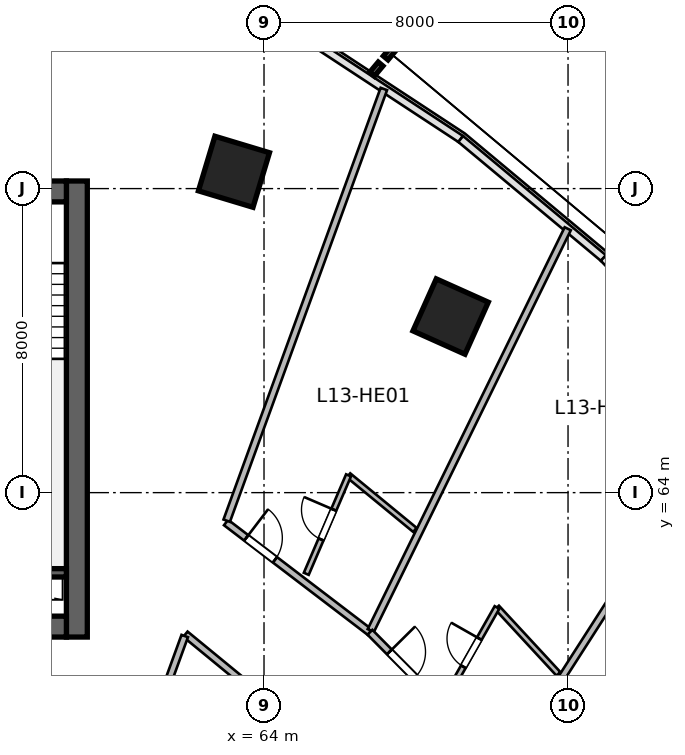
"""IFC4 building model, lengths in metres.
Left out: names, types, materials, properties, quantities, classifications, styles, units other than length and angle.
Written with IfcOpenShell. Run it as: python <this file> out.ifc"""

import sys

from ifc_helpers import new_model, si_unit, direction, frame, frame_2d, origin, origin_2d, place, context, subcontext, project, spatial, rectangle, extrude, source, transform, mapped, element, fill, save


model = new_model("IFC4")
c1 = context("Model", 3, precision=1e-05, world=origin(), true_north=direction((0.0, 1.0)))
c2 = subcontext(c1, "Body", "Model", "MODEL_VIEW")
j1 = project(units=[si_unit("LENGTHUNIT", "METRE"), si_unit("PLANEANGLEUNIT", "RADIAN")], contexts=[c1])
p1 = place(None, origin())
s1 = spatial("IfcSite", under=j1, at=p1, CompositionType="ELEMENT")
p2 = place(p1, origin())
s2 = spatial("IfcBuilding", under=s1, at=p2, CompositionType="ELEMENT")
p3 = place(p2, frame((0.0, 0.0, 60.6)))
s3 = spatial("IfcBuildingStorey", under=s2, at=p3, CompositionType="ELEMENT", Elevation=60.6)
m1 = source(origin(), c2, "Body", "SweptSolid", [
    extrude(rectangle(XDim=12.0, YDim=0.55, at=frame_2d((6.0, 0.0))), origin(), (0.0, 0.0, 1.0), 3.6),
])
p4 = place(p3, frame((59.075, 60.2, 0.0), z_axis=(0.0, 0.0, 1.0), x_axis=(0.0, 1.0, 0.0)))
e1 = element("IfcWall", 1, at=p4, inside=s3, PredefinedType="SHEAR", context=c2, shape_type="MappedRepresentation", body=[
    mapped(m1, transform((0.0, 0.0, 0.0), scale=1.0)),
])
m2 = source(origin(), c2, "Body", "SweptSolid", [
    extrude(rectangle(XDim=21.6, YDim=0.55, at=frame_2d((10.8, 0.0))), origin(), (0.0, 0.0, 1.0), 3.6),
])
p5 = place(p3, frame((37.2, 60.475, 0.0), z_axis=(0.0, 0.0, 1.0), x_axis=(1.0, 0.0, 0.0)))
e2 = element("IfcWall", 2, at=p5, inside=s3, PredefinedType="SHEAR", context=c2, shape_type="MappedRepresentation", body=[
    mapped(m2, transform((0.0, 0.0, 0.0), scale=1.0)),
])
p6 = place(p5, frame((1.1, 0.0, 0.0)))
e3 = element("IfcOpeningElement", 3, at=p6, cuts=e2, PredefinedType="OPENING", context=c2, shape_type="SweptSolid", body=[
    extrude(rectangle(XDim=1.15, YDim=2.15, at=frame_2d((0.575, 1.075))), frame((0.0, 0.285, 0.0), z_axis=(0.0, -1.0, 0.0), x_axis=(1.0, 0.0, 0.0)), (0.0, 0.0, 1.0), 0.57),
])
p7 = place(p5, frame((19.5, 0.0, 0.0)))
e4 = element("IfcOpeningElement", 4, at=p7, cuts=e2, PredefinedType="OPENING", context=c2, shape_type="SweptSolid", body=[
    extrude(rectangle(XDim=0.9, YDim=2.1, at=frame_2d((0.45, 1.05))), frame((0.0, 0.285, 0.0), z_axis=(0.0, -1.0, 0.0), x_axis=(1.0, 0.0, 0.0)), (0.0, 0.0, 1.0), 0.57),
])
p8 = place(p5, frame((12.02, 0.0, 0.0)))
e5 = element("IfcOpeningElement", 5, at=p8, cuts=e2, PredefinedType="OPENING", context=c2, shape_type="SweptSolid", body=[
    extrude(rectangle(XDim=1.6, YDim=2.15, at=frame_2d((0.8, 1.075))), frame((0.0, 0.285, 0.0), z_axis=(0.0, -1.0, 0.0), x_axis=(1.0, 0.0, 0.0)), (0.0, 0.0, 1.0), 0.57),
])
p9 = place(p3, frame((37.2, 71.925, 0.0), z_axis=(0.0, 0.0, 1.0), x_axis=(1.0, 0.0, 0.0)))
e6 = element("IfcWall", 6, at=p9, inside=s3, PredefinedType="SHEAR", context=c2, shape_type="MappedRepresentation", body=[
    mapped(m2, transform((0.0, 0.0, 0.0), scale=1.0)),
])
p10 = place(p9, frame((1.2, 0.0, 0.0)))
e7 = element("IfcOpeningElement", 7, at=p10, cuts=e6, PredefinedType="OPENING", context=c2, shape_type="SweptSolid", body=[
    extrude(rectangle(XDim=0.9, YDim=2.1, at=frame_2d((0.45, 1.05))), frame((0.0, 0.285, 0.0), z_axis=(0.0, -1.0, 0.0), x_axis=(1.0, 0.0, 0.0)), (0.0, 0.0, 1.0), 0.57),
])
p11 = place(p9, frame((14.7, 0.0, 0.0)))
e8 = element("IfcOpeningElement", 8, at=p11, cuts=e6, PredefinedType="OPENING", context=c2, shape_type="SweptSolid", body=[
    extrude(rectangle(XDim=1.2, YDim=2.15, at=frame_2d((0.6, 1.075))), frame((0.0, 0.285, 0.0), z_axis=(0.0, -1.0, 0.0), x_axis=(1.0, 0.0, 0.0)), (0.0, 0.0, 1.0), 0.57),
])
p12 = place(p9, frame((4.15, 0.0, 0.0)))
e9 = element("IfcOpeningElement", 9, at=p12, cuts=e6, PredefinedType="OPENING", context=c2, shape_type="SweptSolid", body=[
    extrude(rectangle(XDim=1.3, YDim=2.15, at=frame_2d((0.65, 1.075))), frame((0.0, 0.285, 0.0), z_axis=(0.0, -1.0, 0.0), x_axis=(1.0, 0.0, 0.0)), (0.0, 0.0, 1.0), 0.57),
])
p13 = place(p9, frame((7.25, 0.0, 0.0)))
e10 = element("IfcOpeningElement", 10, at=p13, cuts=e6, PredefinedType="OPENING", context=c2, shape_type="SweptSolid", body=[
    extrude(rectangle(XDim=0.9, YDim=2.1, at=frame_2d((0.45, 1.05))), frame((0.0, 0.285, 0.0), z_axis=(0.0, -1.0, 0.0), x_axis=(1.0, 0.0, 0.0)), (0.0, 0.0, 1.0), 0.57),
])
m3 = source(origin(), c2, "Body", "SweptSolid", [
    extrude(rectangle(XDim=3.27, YDim=0.22, at=frame_2d((1.635, 0.0))), origin(), (0.0, 0.0, 1.0), 3.6),
])
p14 = place(p3, frame((55.53, 61.89, 0.0), z_axis=(0.0, 0.0, 1.0), x_axis=(1.0, 0.0, 0.0)))
e11 = element("IfcWall", 11, at=p14, inside=s3, PredefinedType="SHEAR", context=c2, shape_type="MappedRepresentation", body=[
    mapped(m3, transform((0.0, 0.0, 0.0), scale=1.0)),
])
m4 = source(origin(), c2, "Body", "SweptSolid", [
    extrude(rectangle(XDim=1.5, YDim=1.5, at=origin_2d()), origin(), (0.0, 0.0, 1.0), 3.6),
])
for number, where, z_axis, x_axis in (
    (12, (63.209, 72.442, 0.0), (0.0, 0.0, 1.0), (0.289, 0.957, 0.0)),
    (13, (68.91, 68.633, 0.0), (0.0, 0.0, 1.0), (0.409, 0.912, 0.0)),
):
    element("IfcColumn", number, at=place(p3, frame(where, z_axis=z_axis, x_axis=x_axis)), inside=s3, PredefinedType="COLUMN", context=c2, shape_type="MappedRepresentation", body=[
        mapped(m4, transform((0.0, 0.0, 0.0), scale=1.0)),
    ])
m5 = source(origin(), c2, "Body", "SweptSolid", [
    extrude(rectangle(XDim=4.762, YDim=0.18, at=frame_2d((2.381, 0.0))), origin(), (0.0, 0.0, 1.0), 3.36),
])
p15 = place(p3, frame((63.001, 63.214, 0.0), z_axis=(0.0, 0.0, 1.0), x_axis=(0.795070295872, -0.60651729128, 0.0)))
e14 = element("IfcWall", 14, at=p15, inside=s3, PredefinedType="PLUMBINGWALL", context=c2, shape_type="MappedRepresentation", body=[
    mapped(m5, transform((0.0, 0.0, 0.0), scale=1.0)),
])
p16 = place(p15, frame((0.668, 0.0, 0.0)))
e15 = element("IfcOpeningElement", 15, at=p16, cuts=e14, PredefinedType="OPENING", context=c2, shape_type="SweptSolid", body=[
    extrude(rectangle(XDim=0.95, YDim=2.15, at=frame_2d((0.475, 1.075))), frame((0.0, 0.1, 0.0), z_axis=(0.0, -1.0, 0.0), x_axis=(1.0, 0.0, 0.0)), (0.0, 0.0, 1.0), 0.2),
])
m6 = source(origin(), c2, "Body", "SweptSolid", [
    extrude(rectangle(XDim=12.088, YDim=0.18, at=frame_2d((6.044, 0.0))), origin(), (0.0, 0.0, 1.0), 3.36),
])
p17 = place(p3, frame((63.019, 63.262, 0.0), z_axis=(0.0, 0.0, 1.0), x_axis=(0.34203007529, 0.939689005787, 0.0)))
e16 = element("IfcWall", 16, at=p17, inside=s3, PredefinedType="PLUMBINGWALL", context=c2, shape_type="MappedRepresentation", body=[
    mapped(m6, transform((0.0, 0.0, 0.0), scale=1.0)),
])
m7 = source(origin(), c2, "Body", "SweptSolid", [
    extrude(rectangle(XDim=11.775, YDim=0.18, at=frame_2d((5.887, 0.0))), origin(), (0.0, 0.0, 1.0), 3.36),
])
p18 = place(p3, frame((66.81, 60.371, 0.0), z_axis=(0.0, 0.0, 1.0), x_axis=(0.4401500056, 0.897924257702, 0.0)))
e17 = element("IfcWall", 17, at=p18, inside=s3, PredefinedType="PLUMBINGWALL", context=c2, shape_type="MappedRepresentation", body=[
    mapped(m7, transform((0.0, 0.0, 0.0), scale=1.0)),
])
m8 = source(origin(), c2, "Body", "SweptSolid", [
    extrude(rectangle(XDim=2.26, YDim=0.14, at=frame_2d((1.13, 0.0))), origin(), (0.0, 0.0, 1.0), 3.36),
])
p19 = place(p3, frame((66.224, 64.455, 0.0), z_axis=(0.0, 0.0, 1.0), x_axis=(0.772646789219, -0.634836151388, 0.0)))
e18 = element("IfcWall", 18, at=p19, inside=s3, PredefinedType="PARTITIONING", context=c2, shape_type="MappedRepresentation", body=[
    mapped(m8, transform((0.0, 0.0, 0.0), scale=1.0)),
])
m9 = source(origin(), c2, "Body", "SweptSolid", [
    extrude(rectangle(XDim=2.819, YDim=0.14, at=frame_2d((1.409, 0.0))), origin(), (0.0, 0.0, 1.0), 3.36),
])
p20 = place(p3, frame((65.112, 61.864, 0.0), z_axis=(0.0, 0.0, 1.0), x_axis=(0.394420979357, 0.918929861874, 0.0)))
e19 = element("IfcWall", 19, at=p20, inside=s3, PredefinedType="PARTITIONING", context=c2, shape_type="MappedRepresentation", body=[
    mapped(m9, transform((0.0, 0.0, 0.0), scale=1.0)),
])
p21 = place(p20, frame((0.984, 0.0, 0.0)))
e20 = element("IfcOpeningElement", 20, at=p21, cuts=e19, PredefinedType="OPENING", context=c2, shape_type="SweptSolid", body=[
    extrude(rectangle(XDim=0.85, YDim=2.05, at=frame_2d((0.425, 1.025))), frame((0.0, 0.08, 0.0), z_axis=(0.0, -1.0, 0.0), x_axis=(1.0, 0.0, 0.0)), (0.0, 0.0, 1.0), 0.16),
])
m10 = source(origin(), c2, "Body", "SweptSolid", [
    extrude(rectangle(XDim=5.012, YDim=0.18, at=frame_2d((2.506, 0.0))), origin(), (0.0, 0.0, 1.0), 3.36),
])
p22 = place(p3, frame((66.788, 60.326, 0.0), z_axis=(0.0, 0.0, 1.0), x_axis=(0.703664626435, -0.710532260707, 0.0)))
e21 = element("IfcWall", 21, at=p22, inside=s3, PredefinedType="PLUMBINGWALL", context=c2, shape_type="MappedRepresentation", body=[
    mapped(m10, transform((0.0, 0.0, 0.0), scale=1.0)),
])
p23 = place(p22, frame((0.728, 0.0, 0.0)))
e22 = element("IfcOpeningElement", 22, at=p23, cuts=e21, PredefinedType="OPENING", context=c2, shape_type="SweptSolid", body=[
    extrude(rectangle(XDim=0.95, YDim=2.15, at=frame_2d((0.475, 1.075))), frame((0.0, 0.1, 0.0), z_axis=(0.0, -1.0, 0.0), x_axis=(1.0, 0.0, 0.0)), (0.0, 0.0, 1.0), 0.2),
])
m11 = source(origin(), c2, "Body", "SweptSolid", [
    extrude(rectangle(XDim=11.432, YDim=0.18, at=frame_2d((5.716, 0.0))), origin(), (0.0, 0.0, 1.0), 3.36),
])
p24 = place(p3, frame((70.341, 56.805, 0.0), z_axis=(0.0, 0.0, 1.0), x_axis=(0.540196183124, 0.841539115988, 0.0)))
e23 = element("IfcWall", 23, at=p24, inside=s3, PredefinedType="PLUMBINGWALL", context=c2, shape_type="MappedRepresentation", body=[
    mapped(m11, transform((0.0, 0.0, 0.0), scale=1.0)),
])
m12 = source(origin(), c2, "Body", "SweptSolid", [
    extrude(rectangle(XDim=2.38, YDim=0.14, at=frame_2d((1.19, 0.0))), origin(), (0.0, 0.0, 1.0), 3.36),
])
p25 = place(p3, frame((70.131, 60.979, 0.0), z_axis=(0.0, 0.0, 1.0), x_axis=(0.679084816758, -0.734059814762, 0.0)))
e24 = element("IfcWall", 24, at=p25, inside=s3, PredefinedType="PARTITIONING", context=c2, shape_type="MappedRepresentation", body=[
    mapped(m12, transform((0.0, 0.0, 0.0), scale=1.0)),
])
m13 = source(origin(), c2, "Body", "SweptSolid", [
    extrude(rectangle(XDim=2.735, YDim=0.14, at=frame_2d((1.367, 0.0))), origin(), (0.0, 0.0, 1.0), 3.36),
])
p26 = place(p3, frame((68.781, 58.6, 0.0), z_axis=(0.0, 0.0, 1.0), x_axis=(0.493694940578, 0.869635156631, 0.0)))
e25 = element("IfcWall", 25, at=p26, inside=s3, PredefinedType="PARTITIONING", context=c2, shape_type="MappedRepresentation", body=[
    mapped(m13, transform((0.0, 0.0, 0.0), scale=1.0)),
])
p27 = place(p26, frame((0.942, 0.0, 0.0)))
e26 = element("IfcOpeningElement", 26, at=p27, cuts=e25, PredefinedType="OPENING", context=c2, shape_type="SweptSolid", body=[
    extrude(rectangle(XDim=0.85, YDim=2.05, at=frame_2d((0.425, 1.025))), frame((0.0, 0.08, 0.0), z_axis=(0.0, -1.0, 0.0), x_axis=(1.0, 0.0, 0.0)), (0.0, 0.0, 1.0), 0.16),
])
m14 = source(origin(), c2, "Body", "SweptSolid", [
    extrude(rectangle(XDim=6.721, YDim=0.18, at=frame_2d((3.361, 0.0))), origin(), (0.0, 0.0, 1.0), 3.36),
])
p28 = place(p3, frame((61.931, 60.275, 0.0), z_axis=(0.0, 0.0, 1.0), x_axis=(0.772828051199, -0.63461547671, 0.0)))
e27 = element("IfcWall", 27, at=p28, inside=s3, PredefinedType="PLUMBINGWALL", context=c2, shape_type="MappedRepresentation", body=[
    mapped(m14, transform((0.0, 0.0, 0.0), scale=1.0)),
])
p29 = place(p28, frame((2.885, 0.0, 0.0)))
e28 = element("IfcOpeningElement", 28, at=p29, cuts=e27, PredefinedType="OPENING", context=c2, shape_type="SweptSolid", body=[
    extrude(rectangle(XDim=0.95, YDim=2.15, at=frame_2d((0.475, 1.075))), frame((0.0, 0.1, 0.0), z_axis=(0.0, -1.0, 0.0), x_axis=(1.0, 0.0, 0.0)), (0.0, 0.0, 1.0), 0.2),
])
m15 = source(origin(), c2, "Body", "SweptSolid", [
    extrude(rectangle(XDim=12.196, YDim=0.18, at=frame_2d((6.098, 0.0))), origin(), (0.0, 0.0, 1.0), 3.36),
])
p30 = place(p3, frame((57.742, 48.766, 0.0), z_axis=(0.0, 0.0, 1.0), x_axis=(0.342022711534, 0.939691686031, 0.0)))
e29 = element("IfcWall", 29, at=p30, inside=s3, PredefinedType="PLUMBINGWALL", context=c2, shape_type="MappedRepresentation", body=[
    mapped(m15, transform((0.0, 0.0, 0.0), scale=1.0)),
])
m16 = source(origin(), c2, "Body", "SweptSolid", [
    extrude(rectangle(XDim=0.95, YDim=2.15, at=frame_2d((0.475, 1.075))), frame((0.0, 0.025, 0.0), z_axis=(0.0, -1.0, 0.0), x_axis=(1.0, 0.0, 0.0)), (0.0, 0.0, 1.0), 0.05),
])
p31 = place(p16, origin())
e30 = element("IfcDoor", 30, at=p31, inside=s3, OperationType="SINGLE_SWING_LEFT", PredefinedType="DOOR", context=c2, shape_type="MappedRepresentation", body=[
    mapped(m16, transform((0.0, 0.0, 0.0), scale=1.0)),
])
fill(e15, e30)
m17 = source(origin(), c2, "Body", "SweptSolid", [
    extrude(rectangle(XDim=0.85, YDim=2.05, at=frame_2d((0.425, 1.025))), frame((0.0, 0.025, 0.0), z_axis=(0.0, -1.0, 0.0), x_axis=(1.0, 0.0, 0.0)), (0.0, 0.0, 1.0), 0.05),
])
p32 = place(p21, origin())
e31 = element("IfcDoor", 31, at=p32, inside=s3, OperationType="SINGLE_SWING_RIGHT", PredefinedType="DOOR", context=c2, shape_type="MappedRepresentation", body=[
    mapped(m17, transform((0.0, 0.0, 0.0), scale=1.0)),
])
fill(e20, e31)
p33 = place(p23, origin())
e32 = element("IfcDoor", 32, at=p33, inside=s3, OperationType="SINGLE_SWING_LEFT", PredefinedType="DOOR", context=c2, shape_type="MappedRepresentation", body=[
    mapped(m16, transform((0.0, 0.0, 0.0), scale=1.0)),
])
fill(e22, e32)
p34 = place(p27, origin())
e33 = element("IfcDoor", 33, at=p34, inside=s3, OperationType="SINGLE_SWING_RIGHT", PredefinedType="DOOR", context=c2, shape_type="MappedRepresentation", body=[
    mapped(m17, transform((0.0, 0.0, 0.0), scale=1.0)),
])
fill(e26, e33)
save(model, sys.argv[1])
